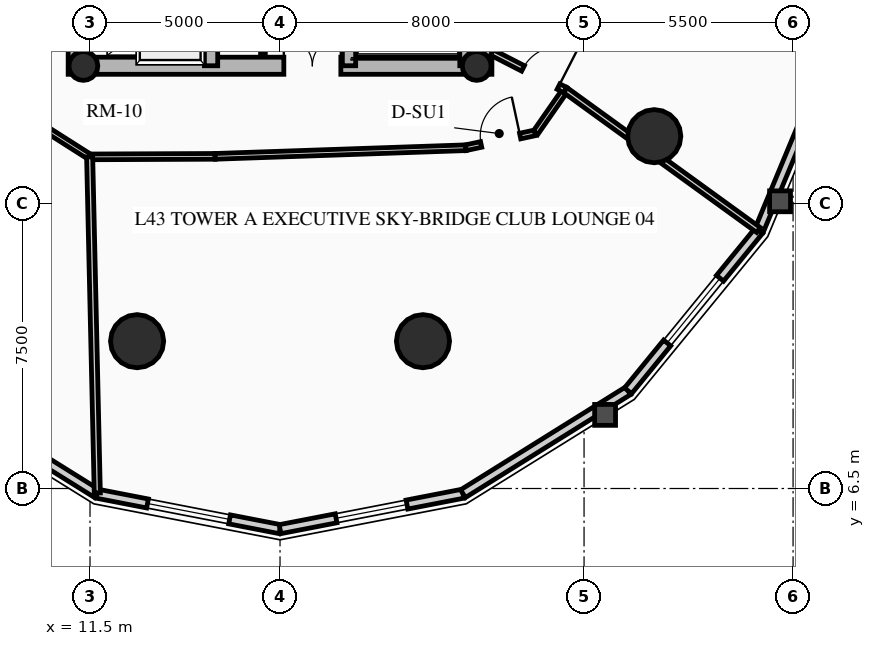
"""IFC4 building model, lengths in metres.
Left out: names, types, materials, properties, quantities, classifications, styles, units other than length and angle.
Written with IfcOpenShell. Run it as: python <this file> out.ifc"""

import sys

from ifc_helpers import new_model, si_unit, direction, frame, frame_2d, origin, origin_2d, place, context, subcontext, project, spatial, rectangle, circle, hollow_circle, extrude, source, transform, mapped, element, fill, save


model = new_model("IFC4")
c1 = context("Model", 3, precision=1e-05, world=origin(), true_north=direction((0.0, 1.0)))
c2 = subcontext(c1, "Body", "Model", "MODEL_VIEW")
j1 = project(units=[si_unit("LENGTHUNIT", "METRE"), si_unit("PLANEANGLEUNIT", "RADIAN")], contexts=[c1])
p1 = place(None, origin())
s1 = spatial("IfcSite", under=j1, at=p1, CompositionType="ELEMENT")
p2 = place(p1, origin())
s2 = spatial("IfcBuilding", under=s1, at=p2, CompositionType="ELEMENT")
p3 = place(p2, frame((0.0, 0.0, 136.6)))
s3 = spatial("IfcBuildingStorey", under=s2, at=p3, CompositionType="ELEMENT", Elevation=136.6)
for number, where, z_axis, x_axis in (
    (1, (11.15, 17.4, 0.0), (0.0, 0.0, 1.0), (0.0, 1.0, 0.0)),
    (2, (21.85, 17.4, 0.0), (0.0, 0.0, 1.0), (0.0, 1.0, 0.0)),
):
    element("IfcWall", number, at=place(p3, frame(where, z_axis=z_axis, x_axis=x_axis)), inside=s3, PredefinedType="SHEAR", context=c2, shape_type="SweptSolid", body=[
        extrude(rectangle(XDim=14.2, YDim=0.45, at=frame_2d((7.1, 0.0))), origin(), (0.0, 0.0, 1.0), 3.72),
    ])
p4 = place(p3, frame((11.15, 17.625, 0.0), z_axis=(0.0, 0.0, 1.0), x_axis=(1.0, 0.0, 0.0)))
e3 = element("IfcWall", 3, at=p4, inside=s3, PredefinedType="SHEAR", context=c2, shape_type="SweptSolid", body=[
    extrude(rectangle(XDim=10.7, YDim=0.45, at=frame_2d((5.35, 0.0))), origin(), (0.0, 0.0, 1.0), 3.72),
])
m1 = source(origin(), c2, "Body", "SweptSolid", [
    extrude(rectangle(XDim=1.5, YDim=2.02, at=frame_2d((0.75, 1.01))), frame((0.0, 0.235, 0.0), z_axis=(0.0, -1.0, 0.0), x_axis=(1.0, 0.0, 0.0)), (0.0, 0.0, 1.0), 0.47),
])
p5 = place(p4, frame((5.45, 0.0, 0.0)))
e4 = element("IfcOpeningElement", 4, at=p5, cuts=e3, PredefinedType="OPENING", context=c2, shape_type="MappedRepresentation", body=[
    mapped(m1, transform((0.0, 0.0, 0.0), x_axis=(1.0, 0.0, 0.0), y_axis=(0.0, 1.0, 0.0), z_axis=(0.0, 0.0, 1.0), scale=1.0)),
])
p6 = place(p3, frame((14.685, 17.625, 0.0), z_axis=(0.0, 0.0, 1.0), x_axis=(0.0, 1.0, 0.0)))
e5 = element("IfcWall", 5, at=p6, inside=s3, PredefinedType="SHEAR", context=c2, shape_type="SweptSolid", body=[
    extrude(rectangle(XDim=13.75, YDim=0.35, at=frame_2d((6.875, 0.0))), origin(), (0.0, 0.0, 1.0), 3.72),
])
m2 = source(origin(), c2, "Body", "SweptSolid", [
    extrude(rectangle(XDim=1.1, YDim=2.015, at=frame_2d((0.55, 1.007))), frame((0.0, 0.185, 0.0), z_axis=(0.0, -1.0, 0.0), x_axis=(1.0, 0.0, 0.0)), (0.0, 0.0, 1.0), 0.37),
])
p7 = place(p6, frame((4.875, 0.0, 0.0)))
e6 = element("IfcOpeningElement", 6, at=p7, cuts=e5, PredefinedType="OPENING", context=c2, shape_type="MappedRepresentation", body=[
    mapped(m2, transform((0.0, 0.0, 0.0), x_axis=(1.0, 0.0, 0.0), y_axis=(0.0, 1.0, 0.0), z_axis=(0.0, 0.0, 1.0), scale=1.0)),
])
p8 = place(p6, frame((0.65, 0.0, 0.0)))
e7 = element("IfcOpeningElement", 7, at=p8, cuts=e5, PredefinedType="OPENING", context=c2, shape_type="MappedRepresentation", body=[
    mapped(m2, transform((0.0, 0.0, 0.0), x_axis=(1.0, 0.0, 0.0), y_axis=(0.0, 1.0, 0.0), z_axis=(0.0, 0.0, 1.0), scale=1.0)),
])
p9 = place(p6, frame((2.65, 0.0, 0.0)))
e8 = element("IfcOpeningElement", 8, at=p9, cuts=e5, PredefinedType="OPENING", context=c2, shape_type="MappedRepresentation", body=[
    mapped(m2, transform((0.0, 0.0, 0.0), x_axis=(1.0, 0.0, 0.0), y_axis=(0.0, 1.0, 0.0), z_axis=(0.0, 0.0, 1.0), scale=1.0)),
])
m3 = source(origin(), c2, "Body", "SweptSolid", [
    extrude(rectangle(XDim=1.15, YDim=2.02, at=frame_2d((0.575, 1.01))), frame((0.0, 0.185, 0.0), z_axis=(0.0, -1.0, 0.0), x_axis=(1.0, 0.0, 0.0)), (0.0, 0.0, 1.0), 0.37),
])
p10 = place(p6, frame((7.295, 0.0, 0.0)))
e9 = element("IfcOpeningElement", 9, at=p10, cuts=e5, PredefinedType="OPENING", context=c2, shape_type="MappedRepresentation", body=[
    mapped(m3, transform((0.0, 0.0, 0.0), x_axis=(1.0, 0.0, 0.0), y_axis=(0.0, 1.0, 0.0), z_axis=(0.0, 0.0, 1.0), scale=1.0)),
])
p11 = place(p3, frame((18.315, 17.625, 0.0), z_axis=(0.0, 0.0, 1.0), x_axis=(0.0, 1.0, 0.0)))
e10 = element("IfcWall", 10, at=p11, inside=s3, PredefinedType="SHEAR", context=c2, shape_type="SweptSolid", body=[
    extrude(rectangle(XDim=9.625, YDim=0.35, at=frame_2d((4.812, 0.0))), origin(), (0.0, 0.0, 1.0), 3.72),
])
p12 = place(p11, frame((5.305, 0.0, 0.0)))
e11 = element("IfcOpeningElement", 11, at=p12, cuts=e10, PredefinedType="OPENING", context=c2, shape_type="MappedRepresentation", body=[
    mapped(m3, transform((0.0, 0.0, 0.0), x_axis=(1.0, 0.0, 0.0), y_axis=(0.0, 1.0, 0.0), z_axis=(0.0, 0.0, 1.0), scale=1.0)),
])
p13 = place(p3, frame((21.405, 17.625, 0.0), z_axis=(0.0, 0.0, 1.0), x_axis=(0.0, 1.0, 0.0)))
e12 = element("IfcWall", 12, at=p13, inside=s3, PredefinedType="SHEAR", context=c2, shape_type="SweptSolid", body=[
    extrude(rectangle(XDim=6.72, YDim=0.35, at=frame_2d((3.36, 0.0))), origin(), (0.0, 0.0, 1.0), 3.72),
])
for number, where, z_axis, x_axis in (
    (13, (11.325, 17.62, 0.0), (0.0, 0.0, 1.0), (1.0, 0.0, 0.0)),
    (14, (21.675, 17.62, 0.0), (0.0, 0.0, 1.0), (1.0, 0.0, 0.0)),
):
    element("IfcColumn", number, at=place(p3, frame(where, z_axis=z_axis, x_axis=x_axis)), inside=s3, PredefinedType="COLUMN", context=c2, shape_type="SweptSolid", body=[
        extrude(hollow_circle(Radius=0.38, WallThickness=0.032, at=origin_2d()), origin(), (0.0, 0.0, 1.0), 3.72),
    ])
for number, where, z_axis, x_axis in (
    (15, (12.739, 10.377, 0.0), (0.0, 0.0, 1.0), (1.0, 0.0, 0.0)),
    (16, (20.261, 10.377, 0.0), (0.0, 0.0, 1.0), (1.0, 0.0, 0.0)),
    (17, (26.347, 15.771, 0.0), (0.0, 0.0, 1.0), (1.0, 0.0, 0.0)),
):
    element("IfcColumn", number, at=place(p3, frame(where, z_axis=z_axis, x_axis=x_axis)), inside=s3, PredefinedType="USERDEFINED", context=c2, shape_type="SweptSolid", body=[
        extrude(circle(Radius=0.7, at=origin_2d()), origin(), (0.0, 0.0, 1.0), 3.72),
    ])
p14 = place(p3, frame((11.685, 6.363, 0.0), z_axis=(0.0, 0.0, 1.0), x_axis=(-0.848520380187, 0.529162701263, 0.0)))
e18 = element("IfcWall", 18, at=p14, inside=s3, PredefinedType="SOLIDWALL", context=c2, shape_type="SweptSolid", body=[
    extrude(rectangle(XDim=5.119, YDim=0.24, at=frame_2d((2.56, 0.0))), origin(), (0.0, 0.0, 1.0), 2.949),
])
m4 = source(origin(), c2, "Body", "SweptSolid", [
    extrude(rectangle(XDim=1.9, YDim=1.35, at=frame_2d((0.95, 0.675))), frame((0.0, 0.13, 0.0), z_axis=(0.0, -1.0, 0.0), x_axis=(1.0, 0.0, 0.0)), (0.0, 0.0, 1.0), 0.26),
])
p15 = place(p14, frame((1.609, 0.0, 0.65)))
e19 = element("IfcOpeningElement", 19, at=p15, cuts=e18, PredefinedType="OPENING", context=c2, shape_type="MappedRepresentation", body=[
    mapped(m4, transform((0.0, 0.0, 0.0), x_axis=(1.0, 0.0, 0.0), y_axis=(0.0, 1.0, 0.0), z_axis=(0.0, 0.0, 1.0), scale=1.0)),
])
p16 = place(p3, frame((16.5, 5.43, 0.0), z_axis=(0.0, 0.0, 1.0), x_axis=(-0.981723785992, 0.190311344954, 0.0)))
e20 = element("IfcWall", 20, at=p16, inside=s3, PredefinedType="SOLIDWALL", context=c2, shape_type="SweptSolid", body=[
    extrude(rectangle(XDim=4.904, YDim=0.24, at=frame_2d((2.452, 0.0))), origin(), (0.0, 0.0, 1.0), 2.949),
])
m5 = source(origin(), c2, "Body", "SweptSolid", [
    extrude(rectangle(XDim=2.2, YDim=1.35, at=frame_2d((1.1, 0.675))), frame((0.0, 0.13, 0.0), z_axis=(0.0, -1.0, 0.0), x_axis=(1.0, 0.0, 0.0)), (0.0, 0.0, 1.0), 0.26),
])
p17 = place(p16, frame((1.352, 0.0, 0.65)))
e21 = element("IfcOpeningElement", 21, at=p17, cuts=e20, PredefinedType="OPENING", context=c2, shape_type="MappedRepresentation", body=[
    mapped(m5, transform((0.0, 0.0, 0.0), x_axis=(1.0, 0.0, 0.0), y_axis=(0.0, 1.0, 0.0), z_axis=(0.0, 0.0, 1.0), scale=1.0)),
])
p18 = place(p3, frame((21.315, 6.363, 0.0), z_axis=(0.0, 0.0, 1.0), x_axis=(-0.981723785992, -0.190311344954, 0.0)))
e22 = element("IfcWall", 22, at=p18, inside=s3, PredefinedType="SOLIDWALL", context=c2, shape_type="SweptSolid", body=[
    extrude(rectangle(XDim=4.904, YDim=0.24, at=frame_2d((2.452, 0.0))), origin(), (0.0, 0.0, 1.0), 2.949),
])
p19 = place(p18, frame((1.502, 0.0, 0.65)))
e23 = element("IfcOpeningElement", 23, at=p19, cuts=e22, PredefinedType="OPENING", context=c2, shape_type="MappedRepresentation", body=[
    mapped(m4, transform((0.0, 0.0, 0.0), x_axis=(1.0, 0.0, 0.0), y_axis=(0.0, 1.0, 0.0), z_axis=(0.0, 0.0, 1.0), scale=1.0)),
])
p20 = place(p3, frame((25.658, 9.072, 0.0), z_axis=(0.0, 0.0, 1.0), x_axis=(-0.848520380187, -0.529162701263, 0.0)))
e24 = element("IfcWall", 24, at=p20, inside=s3, PredefinedType="SOLIDWALL", context=c2, shape_type="SweptSolid", body=[
    extrude(rectangle(XDim=5.119, YDim=0.24, at=frame_2d((2.56, 0.0))), origin(), (0.0, 0.0, 1.0), 2.949),
])
p21 = place(p3, frame((29.105, 13.291, 0.0), z_axis=(0.0, 0.0, 1.0), x_axis=(-0.632700781152, -0.77439635945, 0.0)))
e25 = element("IfcWall", 25, at=p21, inside=s3, PredefinedType="SOLIDWALL", context=c2, shape_type="SweptSolid", body=[
    extrude(rectangle(XDim=5.448, YDim=0.24, at=frame_2d((2.724, 0.0))), origin(), (0.0, 0.0, 1.0), 2.949),
])
p22 = place(p21, frame((1.624, 0.0, 0.65)))
e26 = element("IfcOpeningElement", 26, at=p22, cuts=e25, PredefinedType="OPENING", context=c2, shape_type="MappedRepresentation", body=[
    mapped(m5, transform((0.0, 0.0, 0.0), x_axis=(1.0, 0.0, 0.0), y_axis=(0.0, 1.0, 0.0), z_axis=(0.0, 0.0, 1.0), scale=1.0)),
])
p23 = place(p3, frame((31.318, 18.607, 0.0), z_axis=(0.0, 0.0, 1.0), x_axis=(-0.384344417632, -0.923189779317, 0.0)))
e27 = element("IfcWall", 27, at=p23, inside=s3, PredefinedType="SOLIDWALL", context=c2, shape_type="SweptSolid", body=[
    extrude(rectangle(XDim=5.758, YDim=0.24, at=frame_2d((2.879, 0.0))), origin(), (0.0, 0.0, 1.0), 2.949),
])
p24 = place(p3, frame((16.05, 17.92, 0.0), z_axis=(0.0, 0.0, 1.0), x_axis=(0.0, 1.0, 0.0)))
e28 = element("IfcWall", 28, at=p24, inside=s3, PredefinedType="PARTITIONING", context=c2, shape_type="SweptSolid", body=[
    extrude(rectangle(XDim=1.8, YDim=0.125, at=frame_2d((0.9, 0.0))), origin(), (0.0, 0.0, 1.0), 3.425),
])
m6 = source(origin(), c2, "Body", "SweptSolid", [
    extrude(rectangle(XDim=0.9, YDim=2.005, at=frame_2d((0.45, 1.002))), frame((0.0, 0.073, 0.0), z_axis=(0.0, -1.0, 0.0), x_axis=(1.0, 0.0, 0.0)), (0.0, 0.0, 1.0), 0.145),
])
p25 = place(p24, frame((0.42, 0.0, 0.0)))
e29 = element("IfcOpeningElement", 29, at=p25, cuts=e28, PredefinedType="OPENING", context=c2, shape_type="MappedRepresentation", body=[
    mapped(m6, transform((0.0, 0.0, 0.0), x_axis=(1.0, 0.0, 0.0), y_axis=(0.0, 1.0, 0.0), z_axis=(0.0, 0.0, 1.0), scale=1.0)),
])
p26 = place(p3, frame((10.156, 16.075, 0.0), z_axis=(0.0, 0.0, 1.0), x_axis=(0.843896624713, -0.536505812455, 0.0)))
e30 = element("IfcWall", 30, at=p26, inside=s3, PredefinedType="PARTITIONING", context=c2, shape_type="SweptSolid", body=[
    extrude(rectangle(XDim=1.581, YDim=0.15, at=frame_2d((0.791, 0.0))), origin(), (0.0, 0.0, 1.0), 2.995),
])
p27 = place(p3, frame((11.49, 15.227, 0.0), z_axis=(0.0, 0.0, 1.0), x_axis=(0.999991728046, 0.004067411998, 0.0)))
e31 = element("IfcWall", 31, at=p27, inside=s3, PredefinedType="PARTITIONING", context=c2, shape_type="SweptSolid", body=[
    extrude(rectangle(XDim=3.301, YDim=0.15, at=frame_2d((1.651, 0.0))), origin(), (0.0, 0.0, 1.0), 2.995),
])
p28 = place(p3, frame((14.792, 15.24, 0.0), z_axis=(0.0, 0.0, 1.0), x_axis=(0.999408106202, 0.034401122909, 0.0)))
e32 = element("IfcWall", 32, at=p28, inside=s3, PredefinedType="PARTITIONING", context=c2, shape_type="SweptSolid", body=[
    extrude(rectangle(XDim=6.6, YDim=0.15, at=frame_2d((3.3, 0.0))), origin(), (0.0, 0.0, 1.0), 2.995),
])
p29 = place(p3, frame((21.388, 15.468, 0.0), z_axis=(0.0, 0.0, 1.0), x_axis=(0.977672748596, 0.210133283069, 0.0)))
e33 = element("IfcWall", 33, at=p29, inside=s3, PredefinedType="PARTITIONING", context=c2, shape_type="SweptSolid", body=[
    extrude(rectangle(XDim=1.876, YDim=0.15, at=frame_2d((0.938, 0.0))), origin(), (0.0, 0.0, 1.0), 2.995),
])
m7 = source(origin(), c2, "Body", "SweptSolid", [
    extrude(rectangle(XDim=1.05, YDim=2.015, at=frame_2d((0.525, 1.007))), frame((0.0, 0.085, 0.0), z_axis=(0.0, -1.0, 0.0), x_axis=(1.0, 0.0, 0.0)), (0.0, 0.0, 1.0), 0.17),
])
p30 = place(p29, frame((0.413, 0.0, 0.0)))
e34 = element("IfcOpeningElement", 34, at=p30, cuts=e33, PredefinedType="OPENING", context=c2, shape_type="MappedRepresentation", body=[
    mapped(m7, transform((0.0, 0.0, 0.0), x_axis=(1.0, 0.0, 0.0), y_axis=(0.0, 1.0, 0.0), z_axis=(0.0, 0.0, 1.0), scale=1.0)),
])
p31 = place(p3, frame((23.222, 15.862, 0.0), z_axis=(0.0, 0.0, 1.0), x_axis=(0.571941738195, 0.820294244836, 0.0)))
e35 = element("IfcWall", 35, at=p31, inside=s3, PredefinedType="PARTITIONING", context=c2, shape_type="SweptSolid", body=[
    extrude(rectangle(XDim=1.369, YDim=0.15, at=frame_2d((0.685, 0.0))), origin(), (0.0, 0.0, 1.0), 2.995),
])
p32 = place(p3, frame((11.49, 15.227, 0.0), z_axis=(0.0, 0.0, 1.0), x_axis=(0.022711375682, -0.999742063442, 0.0)))
e36 = element("IfcWall", 36, at=p32, inside=s3, PredefinedType="PARTITIONING", context=c2, shape_type="SweptSolid", body=[
    extrude(rectangle(XDim=8.847, YDim=0.16, at=frame_2d((4.423, 0.0))), origin(), (0.0, 0.0, 1.0), 2.949),
])
p33 = place(p3, frame((24.006, 16.985, 0.0), z_axis=(0.0, 0.0, 1.0), x_axis=(0.809849730791, -0.586637378231, 0.0)))
e37 = element("IfcWall", 37, at=p33, inside=s3, PredefinedType="PARTITIONING", context=c2, shape_type="SweptSolid", body=[
    extrude(rectangle(XDim=6.277, YDim=0.16, at=frame_2d((3.139, 0.0))), origin(), (0.0, 0.0, 1.0), 2.949),
])
p34 = place(p3, frame((22.075, 17.975, 0.0), z_axis=(0.0, 0.0, 1.0), x_axis=(0.889835034782, -0.456282380632, 0.0)))
e38 = element("IfcWall", 38, at=p34, inside=s3, PredefinedType="PARTITIONING", context=c2, shape_type="SweptSolid", body=[
    extrude(rectangle(XDim=2.17, YDim=0.16, at=frame_2d((1.085, 0.0))), origin(), (0.0, 0.0, 1.0), 2.995),
])
m8 = source(origin(), c2, "Body", "SweptSolid", [
    extrude(rectangle(XDim=1.05, YDim=2.015, at=frame_2d((0.525, 1.007))), frame((0.0, 0.09, 0.0), z_axis=(0.0, -1.0, 0.0), x_axis=(1.0, 0.0, 0.0)), (0.0, 0.0, 1.0), 0.18),
])
p35 = place(p34, frame((0.92, 0.0, 0.0)))
e39 = element("IfcOpeningElement", 39, at=p35, cuts=e38, PredefinedType="OPENING", context=c2, shape_type="MappedRepresentation", body=[
    mapped(m8, transform((0.0, 0.0, 0.0), x_axis=(1.0, 0.0, 0.0), y_axis=(0.0, 1.0, 0.0), z_axis=(0.0, 0.0, 1.0), scale=1.0)),
])
m9 = source(origin(), c2, "Body", "SweptSolid", [
    extrude(rectangle(XDim=2.2, YDim=1.35, at=frame_2d((1.1, 0.675))), frame((0.0, 0.03, 0.0), z_axis=(0.0, -1.0, 0.0), x_axis=(1.0, 0.0, 0.0)), (0.0, 0.0, 1.0), 0.06),
])
p36 = place(p17, origin())
e40 = element("IfcWindow", 40, at=p36, inside=s3, PartitioningType="DOUBLE_PANEL_VERTICAL", PredefinedType="WINDOW", context=c2, shape_type="MappedRepresentation", body=[
    mapped(m9, transform((0.0, 0.0, 0.0), x_axis=(1.0, 0.0, 0.0), y_axis=(0.0, 1.0, 0.0), z_axis=(0.0, 0.0, 1.0), scale=1.0)),
])
fill(e21, e40)
m10 = source(origin(), c2, "Body", "SweptSolid", [
    extrude(rectangle(XDim=1.9, YDim=1.35, at=frame_2d((0.95, 0.675))), frame((0.0, 0.03, 0.0), z_axis=(0.0, -1.0, 0.0), x_axis=(1.0, 0.0, 0.0)), (0.0, 0.0, 1.0), 0.06),
])
p37 = place(p19, origin())
e41 = element("IfcWindow", 41, at=p37, inside=s3, PartitioningType="DOUBLE_PANEL_VERTICAL", PredefinedType="WINDOW", context=c2, shape_type="MappedRepresentation", body=[
    mapped(m10, transform((0.0, 0.0, 0.0), x_axis=(1.0, 0.0, 0.0), y_axis=(0.0, 1.0, 0.0), z_axis=(0.0, 0.0, 1.0), scale=1.0)),
])
fill(e23, e41)
p38 = place(p22, origin())
e42 = element("IfcWindow", 42, at=p38, inside=s3, PartitioningType="DOUBLE_PANEL_VERTICAL", PredefinedType="WINDOW", context=c2, shape_type="MappedRepresentation", body=[
    mapped(m9, transform((0.0, 0.0, 0.0), x_axis=(1.0, 0.0, 0.0), y_axis=(0.0, 1.0, 0.0), z_axis=(0.0, 0.0, 1.0), scale=1.0)),
])
fill(e26, e42)
m11 = source(origin(), c2, "Body", "SweptSolid", [
    extrude(rectangle(XDim=1.5, YDim=2.02, at=frame_2d((0.75, 1.01))), frame((0.0, 0.025, 0.0), z_axis=(0.0, -1.0, 0.0), x_axis=(1.0, 0.0, 0.0)), (0.0, 0.0, 1.0), 0.05),
])
p39 = place(p5, origin())
e43 = element("IfcDoor", 43, at=p39, inside=s3, OperationType="DOUBLE_DOOR_SINGLE_SWING", PredefinedType="DOOR", context=c2, shape_type="MappedRepresentation", body=[
    mapped(m11, transform((0.0, 0.0, 0.0), x_axis=(1.0, 0.0, 0.0), y_axis=(0.0, 1.0, 0.0), z_axis=(0.0, 0.0, 1.0), scale=1.0)),
])
fill(e4, e43)
m12 = source(origin(), c2, "Body", "SweptSolid", [
    extrude(rectangle(XDim=1.05, YDim=2.015, at=frame_2d((0.525, 1.007))), frame((0.0, 0.025, 0.0), z_axis=(0.0, -1.0, 0.0), x_axis=(1.0, 0.0, 0.0)), (0.0, 0.0, 1.0), 0.05),
])
p40 = place(p35, origin())
e44 = element("IfcDoor", 44, at=p40, inside=s3, OperationType="SINGLE_SWING_RIGHT", PredefinedType="DOOR", context=c2, shape_type="MappedRepresentation", body=[
    mapped(m12, transform((0.0, 0.0, 0.0), x_axis=(1.0, 0.0, 0.0), y_axis=(0.0, 1.0, 0.0), z_axis=(0.0, 0.0, 1.0), scale=1.0)),
])
fill(e39, e44)
p41 = place(p30, origin())
e45 = element("IfcDoor", 45, at=p41, inside=s3, OperationType="SINGLE_SWING_RIGHT", PredefinedType="DOOR", context=c2, shape_type="MappedRepresentation", body=[
    mapped(m12, transform((0.0, 0.0, 0.0), x_axis=(1.0, 0.0, 0.0), y_axis=(0.0, 1.0, 0.0), z_axis=(0.0, 0.0, 1.0), scale=1.0)),
])
fill(e34, e45)
save(model, sys.argv[1])
